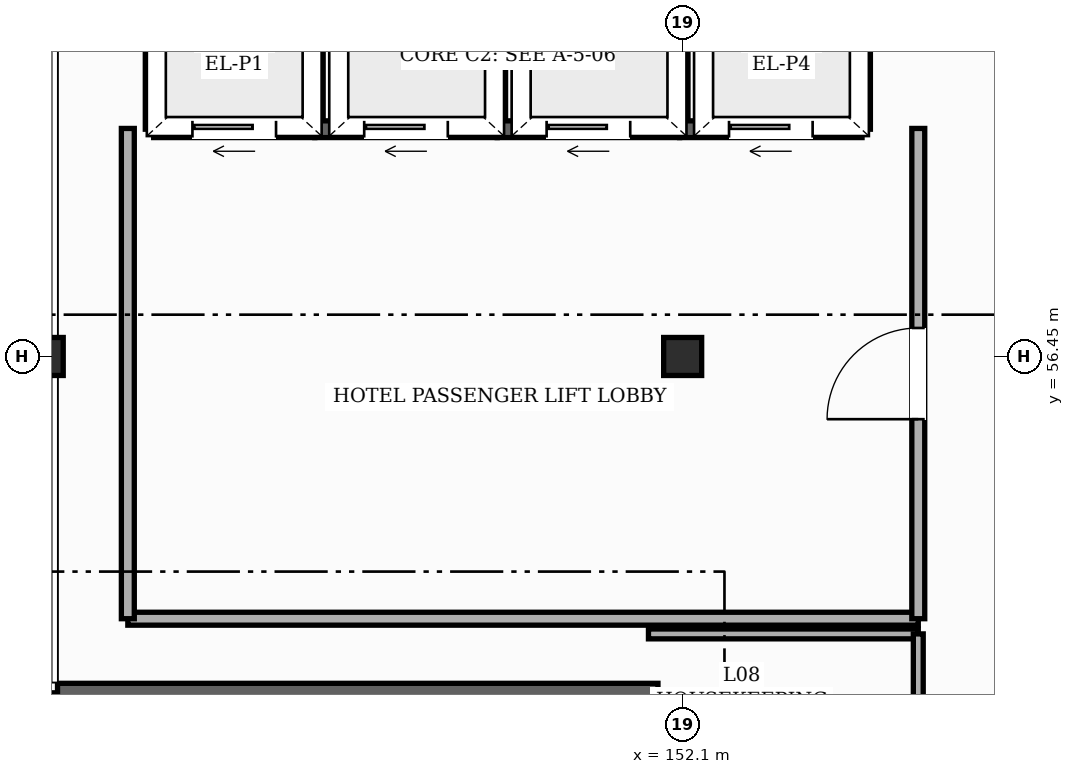
"""IFC4 building model, lengths in metres.
Left out: names, types, materials, properties, quantities, classifications, styles, units other than length and angle.
Written with IfcOpenShell. Run it as: python <this file> out.ifc"""

import sys

from ifc_helpers import new_model, si_unit, direction, frame, frame_2d, origin, origin_2d, place, context, subcontext, project, spatial, rectangle, hollow_rectangle, extrude, element, fill, save


model = new_model("IFC4")
c1 = context("Model", 3, precision=1e-05, world=origin(), true_north=direction((0.0, 1.0)))
c2 = subcontext(c1, "Body", "Model", "MODEL_VIEW")
j1 = project(units=[si_unit("LENGTHUNIT", "METRE"), si_unit("PLANEANGLEUNIT", "RADIAN")], contexts=[c1])
p1 = place(None, origin())
s1 = spatial("IfcSite", under=j1, at=p1, CompositionType="ELEMENT")
p2 = place(p1, origin())
s2 = spatial("IfcBuilding", under=s1, at=p2, CompositionType="ELEMENT")
p3 = place(p2, frame((0.0, 0.0, 35.4)))
s3 = spatial("IfcBuildingStorey", under=s2, at=p3, CompositionType="ELEMENT", Elevation=35.4)
for number, where, z_axis, x_axis in (
    (1, (143.7, 56.45, 0.0), (0.0, 0.0, 1.0), (1.0, 0.0, 0.0)),
    (2, (152.1, 56.45, 0.0), (0.0, 0.0, 1.0), (1.0, 0.0, 0.0)),
):
    element("IfcColumn", number, at=place(p3, frame(where, z_axis=z_axis, x_axis=x_axis)), inside=s3, PredefinedType="COLUMN", context=c2, shape_type="SweptSolid", body=[
        extrude(hollow_rectangle(XDim=0.5, YDim=0.5, WallThickness=0.022, InnerFilletRadius=0.022, OuterFilletRadius=0.044, at=origin_2d()), origin(), (0.0, 0.0, 1.0), 3.6),
    ])
for number, where, z_axis, x_axis in (
    (3, (143.875, 48.675, 0.0), (0.0, 0.0, 1.0), (0.0, 1.0, 0.0)),
    (4, (151.775, 52.025, 0.0), (0.0, 0.0, 1.0), (0.0, -1.0, 0.0)),
):
    element("IfcWall", number, at=place(p3, frame(where, z_axis=z_axis, x_axis=x_axis)), inside=s3, PredefinedType="SHEAR", context=c2, shape_type="SweptSolid", body=[
        extrude(rectangle(XDim=3.35, YDim=0.25, at=frame_2d((1.675, 0.0))), origin(), (0.0, 0.0, 1.0), 3.38),
    ])
p4 = place(p3, frame((143.875, 52.025, 0.0), z_axis=(0.0, 0.0, 1.0), x_axis=(1.0, 0.0, 0.0)))
e5 = element("IfcWall", 5, at=p4, inside=s3, PredefinedType="SHEAR", context=c2, shape_type="SweptSolid", body=[
    extrude(rectangle(XDim=7.9, YDim=0.25, at=frame_2d((3.95, 0.0))), origin(), (0.0, 0.0, 1.0), 3.38),
])
p5 = place(p3, frame((145.14, 59.44, 0.0), z_axis=(0.0, 0.0, 1.0), x_axis=(1.0, 0.0, 0.0)))
e6 = element("IfcWall", 6, at=p5, inside=s3, PredefinedType="SHEAR", context=c2, shape_type="SweptSolid", body=[
    extrude(rectangle(XDim=2.12, YDim=0.22, at=frame_2d((1.06, 0.0))), origin(), (0.0, 0.0, 1.0), 3.38),
])
p6 = place(p5, frame((0.51, 0.0, 0.0)))
e7 = element("IfcOpeningElement", 7, at=p6, cuts=e6, PredefinedType="OPENING", context=c2, shape_type="SweptSolid", body=[
    extrude(rectangle(XDim=1.1, YDim=2.2, at=frame_2d((0.55, 1.1))), frame((0.0, 0.12, 0.0), z_axis=(0.0, -1.0, 0.0), x_axis=(1.0, 0.0, 0.0)), (0.0, 0.0, 1.0), 0.24),
])
for number, where, z_axis, x_axis in (
    (8, (147.26, 59.44, 0.0), (0.0, 0.0, 1.0), (0.0, 1.0, 0.0)),
    (9, (145.14, 59.44, 0.0), (0.0, 0.0, 1.0), (0.0, 1.0, 0.0)),
):
    element("IfcWall", number, at=place(p3, frame(where, z_axis=z_axis, x_axis=x_axis)), inside=s3, PredefinedType="SHEAR", context=c2, shape_type="SweptSolid", body=[
        extrude(rectangle(XDim=1.92, YDim=0.22, at=frame_2d((0.96, 0.0))), origin(), (0.0, 0.0, 1.0), 3.38),
    ])
p7 = place(p3, frame((147.26, 59.44, 0.0), z_axis=(0.0, 0.0, 1.0), x_axis=(1.0, 0.0, 0.0)))
e10 = element("IfcWall", 10, at=p7, inside=s3, PredefinedType="SHEAR", context=c2, shape_type="SweptSolid", body=[
    extrude(rectangle(XDim=2.4, YDim=0.22, at=frame_2d((1.2, 0.0))), origin(), (0.0, 0.0, 1.0), 3.38),
])
p8 = place(p7, frame((0.65, 0.0, 0.0)))
e11 = element("IfcOpeningElement", 11, at=p8, cuts=e10, PredefinedType="OPENING", context=c2, shape_type="SweptSolid", body=[
    extrude(rectangle(XDim=1.1, YDim=2.2, at=frame_2d((0.55, 1.1))), frame((0.0, 0.12, 0.0), z_axis=(0.0, -1.0, 0.0), x_axis=(1.0, 0.0, 0.0)), (0.0, 0.0, 1.0), 0.24),
])
p9 = place(p3, frame((149.66, 59.44, 0.0), z_axis=(0.0, 0.0, 1.0), x_axis=(0.0, 1.0, 0.0)))
e12 = element("IfcWall", 12, at=p9, inside=s3, PredefinedType="SHEAR", context=c2, shape_type="SweptSolid", body=[
    extrude(rectangle(XDim=1.92, YDim=0.22, at=frame_2d((0.96, 0.0))), origin(), (0.0, 0.0, 1.0), 3.38),
])
p10 = place(p3, frame((149.66, 59.44, 0.0), z_axis=(0.0, 0.0, 1.0), x_axis=(1.0, 0.0, 0.0)))
e13 = element("IfcWall", 13, at=p10, inside=s3, PredefinedType="SHEAR", context=c2, shape_type="SweptSolid", body=[
    extrude(rectangle(XDim=2.4, YDim=0.22, at=frame_2d((1.2, 0.0))), origin(), (0.0, 0.0, 1.0), 3.38),
])
p11 = place(p10, frame((0.65, 0.0, 0.0)))
e14 = element("IfcOpeningElement", 14, at=p11, cuts=e13, PredefinedType="OPENING", context=c2, shape_type="SweptSolid", body=[
    extrude(rectangle(XDim=1.1, YDim=2.2, at=frame_2d((0.55, 1.1))), frame((0.0, 0.12, 0.0), z_axis=(0.0, -1.0, 0.0), x_axis=(1.0, 0.0, 0.0)), (0.0, 0.0, 1.0), 0.24),
])
p12 = place(p3, frame((152.06, 59.44, 0.0), z_axis=(0.0, 0.0, 1.0), x_axis=(0.0, 1.0, 0.0)))
e15 = element("IfcWall", 15, at=p12, inside=s3, PredefinedType="SHEAR", context=c2, shape_type="SweptSolid", body=[
    extrude(rectangle(XDim=1.92, YDim=0.22, at=frame_2d((0.96, 0.0))), origin(), (0.0, 0.0, 1.0), 3.38),
])
p13 = place(p3, frame((152.06, 59.44, 0.0), z_axis=(0.0, 0.0, 1.0), x_axis=(1.0, 0.0, 0.0)))
e16 = element("IfcWall", 16, at=p13, inside=s3, PredefinedType="SHEAR", context=c2, shape_type="SweptSolid", body=[
    extrude(rectangle(XDim=2.4, YDim=0.22, at=frame_2d((1.2, 0.0))), origin(), (0.0, 0.0, 1.0), 3.38),
])
p14 = place(p13, frame((0.65, 0.0, 0.0)))
e17 = element("IfcOpeningElement", 17, at=p14, cuts=e16, PredefinedType="OPENING", context=c2, shape_type="SweptSolid", body=[
    extrude(rectangle(XDim=1.1, YDim=2.2, at=frame_2d((0.55, 1.1))), frame((0.0, 0.12, 0.0), z_axis=(0.0, -1.0, 0.0), x_axis=(1.0, 0.0, 0.0)), (0.0, 0.0, 1.0), 0.24),
])
p15 = place(p3, frame((154.46, 59.44, 0.0), z_axis=(0.0, 0.0, 1.0), x_axis=(0.0, 1.0, 0.0)))
e18 = element("IfcWall", 18, at=p15, inside=s3, PredefinedType="SHEAR", context=c2, shape_type="SweptSolid", body=[
    extrude(rectangle(XDim=1.92, YDim=0.22, at=frame_2d((0.96, 0.0))), origin(), (0.0, 0.0, 1.0), 3.38),
])
p16 = place(p3, frame((151.65, 52.8, 0.0), z_axis=(0.0, 0.0, 1.0), x_axis=(1.0, 0.0, 0.0)))
e19 = element("IfcWall", 19, at=p16, inside=s3, PredefinedType="PARTITIONING", context=c2, shape_type="SweptSolid", body=[
    extrude(rectangle(XDim=3.55, YDim=0.13, at=frame_2d((1.775, 0.0))), origin(), (0.0, 0.0, 1.0), 3.365),
])
p17 = place(p3, frame((144.8, 53.0, 0.0), z_axis=(0.0, 0.0, 1.0), x_axis=(1.0, 0.0, 0.0)))
e20 = element("IfcWall", 20, at=p17, inside=s3, PredefinedType="PARTITIONING", context=c2, shape_type="SweptSolid", body=[
    extrude(rectangle(XDim=10.4, YDim=0.17, at=frame_2d((5.2, 0.0))), origin(), (0.0, 0.0, 1.0), 3.365),
])
p18 = place(p3, frame((144.8, 53.0, 0.0), z_axis=(0.0, 0.0, 1.0), x_axis=(0.0, 1.0, 0.0)))
e21 = element("IfcWall", 21, at=p18, inside=s3, PredefinedType="PARTITIONING", context=c2, shape_type="SweptSolid", body=[
    extrude(rectangle(XDim=6.45, YDim=0.17, at=frame_2d((3.225, 0.0))), origin(), (0.0, 0.0, 1.0), 3.365),
])
p19 = place(p3, frame((155.2, 48.8, 0.0), z_axis=(0.0, 0.0, 1.0), x_axis=(0.0, 1.0, 0.0)))
e22 = element("IfcWall", 22, at=p19, inside=s3, PredefinedType="PARTITIONING", context=c2, shape_type="SweptSolid", body=[
    extrude(rectangle(XDim=4.0, YDim=0.13, at=frame_2d((2.0, 0.0))), origin(), (0.0, 0.0, 1.0), 3.365),
])
p20 = place(p19, frame((1.55, 0.0, 0.0)))
e23 = element("IfcOpeningElement", 23, at=p20, cuts=e22, PredefinedType="OPENING", context=c2, shape_type="SweptSolid", body=[
    extrude(rectangle(XDim=0.9, YDim=2.15, at=frame_2d((0.45, 1.075))), frame((0.0, 0.075, 0.0), z_axis=(0.0, -1.0, 0.0), x_axis=(1.0, 0.0, 0.0)), (0.0, 0.0, 1.0), 0.15),
])
p21 = place(p3, frame((155.2, 53.0, 0.0), z_axis=(0.0, 0.0, 1.0), x_axis=(0.0, 1.0, 0.0)))
e24 = element("IfcWall", 24, at=p21, inside=s3, PredefinedType="PARTITIONING", context=c2, shape_type="SweptSolid", body=[
    extrude(rectangle(XDim=6.45, YDim=0.17, at=frame_2d((3.225, 0.0))), origin(), (0.0, 0.0, 1.0), 3.365),
])
p22 = place(p21, frame((2.625, 0.0, 0.0)))
e25 = element("IfcOpeningElement", 25, at=p22, cuts=e24, PredefinedType="OPENING", context=c2, shape_type="SweptSolid", body=[
    extrude(rectangle(XDim=1.2, YDim=2.2, at=frame_2d((0.6, 1.1))), frame((0.0, 0.095, 0.0), z_axis=(0.0, -1.0, 0.0), x_axis=(1.0, 0.0, 0.0)), (0.0, 0.0, 1.0), 0.19),
])
p23 = place(p6, origin())
e26 = element("IfcDoor", 26, at=p23, inside=s3, OperationType="SLIDING_TO_LEFT", PredefinedType="DOOR", context=c2, shape_type="SweptSolid", body=[
    extrude(rectangle(XDim=1.1, YDim=2.2, at=frame_2d((0.55, 1.1))), frame((0.0, 0.025, 0.0), z_axis=(0.0, -1.0, 0.0), x_axis=(1.0, 0.0, 0.0)), (0.0, 0.0, 1.0), 0.05),
])
fill(e7, e26)
p24 = place(p8, origin())
e27 = element("IfcDoor", 27, at=p24, inside=s3, OperationType="SLIDING_TO_LEFT", PredefinedType="DOOR", context=c2, shape_type="SweptSolid", body=[
    extrude(rectangle(XDim=1.1, YDim=2.2, at=frame_2d((0.55, 1.1))), frame((0.0, 0.025, 0.0), z_axis=(0.0, -1.0, 0.0), x_axis=(1.0, 0.0, 0.0)), (0.0, 0.0, 1.0), 0.05),
])
fill(e11, e27)
p25 = place(p11, origin())
e28 = element("IfcDoor", 28, at=p25, inside=s3, OperationType="SLIDING_TO_LEFT", PredefinedType="DOOR", context=c2, shape_type="SweptSolid", body=[
    extrude(rectangle(XDim=1.1, YDim=2.2, at=frame_2d((0.55, 1.1))), frame((0.0, 0.025, 0.0), z_axis=(0.0, -1.0, 0.0), x_axis=(1.0, 0.0, 0.0)), (0.0, 0.0, 1.0), 0.05),
])
fill(e14, e28)
p26 = place(p14, origin())
e29 = element("IfcDoor", 29, at=p26, inside=s3, OperationType="SLIDING_TO_LEFT", PredefinedType="DOOR", context=c2, shape_type="SweptSolid", body=[
    extrude(rectangle(XDim=1.1, YDim=2.2, at=frame_2d((0.55, 1.1))), frame((0.0, 0.025, 0.0), z_axis=(0.0, -1.0, 0.0), x_axis=(1.0, 0.0, 0.0)), (0.0, 0.0, 1.0), 0.05),
])
fill(e17, e29)
p27 = place(p22, origin())
e30 = element("IfcDoor", 30, at=p27, inside=s3, OperationType="SINGLE_SWING_LEFT", PredefinedType="DOOR", context=c2, shape_type="SweptSolid", body=[
    extrude(rectangle(XDim=1.2, YDim=2.2, at=frame_2d((0.6, 1.1))), frame((0.0, 0.025, 0.0), z_axis=(0.0, -1.0, 0.0), x_axis=(1.0, 0.0, 0.0)), (0.0, 0.0, 1.0), 0.05),
])
fill(e25, e30)
save(model, sys.argv[1])
